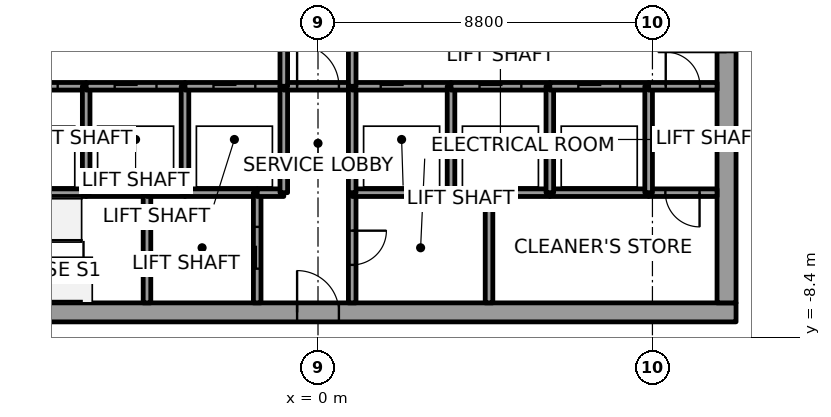
"""IFC4 building model, lengths in metres.
Left out: names, types, materials, properties, quantities, classifications, styles, units other than length and angle.
Written with IfcOpenShell. Run it as: python <this file> out.ifc"""

import sys

from ifc_helpers import new_model, si_unit, direction, frame, frame_2d, origin, place, context, subcontext, project, spatial, rectangle, extrude, element, fill, save


model = new_model("IFC4")
c1 = context("Model", 3, precision=1e-05, world=origin(), true_north=direction((0.0, 1.0)))
c2 = subcontext(c1, "Body", "Model", "MODEL_VIEW")
j1 = project(units=[si_unit("LENGTHUNIT", "METRE"), si_unit("PLANEANGLEUNIT", "RADIAN")], contexts=[c1])
p1 = place(None, origin())
s1 = spatial("IfcSite", under=j1, at=p1, CompositionType="ELEMENT")
p2 = place(p1, origin())
s2 = spatial("IfcBuilding", under=s1, at=p2, CompositionType="ELEMENT")
p3 = place(p2, frame((0.0, 0.0, 165.8)))
s3 = spatial("IfcBuildingStorey", under=s2, at=p3, CompositionType="ELEMENT", Elevation=165.8)
p4 = place(p3, frame((-11.0, -7.75, 0.0), z_axis=(0.0, 0.0, 1.0), x_axis=(1.0, 0.0, 0.0)))
e1 = element("IfcWall", 1, at=p4, inside=s3, PredefinedType="SHEAR", context=c2, shape_type="SweptSolid", body=[
    extrude(rectangle(XDim=22.0, YDim=0.5, at=frame_2d((11.0, 0.0))), origin(), (0.0, 0.0, 1.0), 4.0),
])
p5 = place(p4, frame((10.45, 0.0, 0.0)))
e2 = element("IfcOpeningElement", 2, at=p5, cuts=e1, PredefinedType="OPENING", context=c2, shape_type="SweptSolid", body=[
    extrude(rectangle(XDim=1.1, YDim=2.1, at=frame_2d((0.55, 1.05))), frame((0.0, 0.25, 0.0), z_axis=(0.0, -1.0, 0.0), x_axis=(1.0, 0.0, 0.0)), (0.0, 0.0, 1.0), 0.5),
])
p6 = place(p3, frame((10.75, -7.5, 0.0), z_axis=(0.0, 0.0, 1.0), x_axis=(0.0, 1.0, 0.0)))
e3 = element("IfcWall", 3, at=p6, inside=s3, PredefinedType="SHEAR", context=c2, shape_type="SweptSolid", body=[
    extrude(rectangle(XDim=15.0, YDim=0.5, at=frame_2d((7.5, 0.0))), origin(), (0.0, 0.0, 1.0), 4.0),
])
p7 = place(p6, frame((6.6, 0.0, 0.0)))
e4 = element("IfcOpeningElement", 4, at=p7, cuts=e3, PredefinedType="OPENING", context=c2, shape_type="SweptSolid", body=[
    extrude(rectangle(XDim=1.8, YDim=2.1, at=frame_2d((0.9, 1.05))), frame((0.0, 0.25, 0.0), z_axis=(0.0, -1.0, 0.0), x_axis=(1.0, 0.0, 0.0)), (0.0, 0.0, 1.0), 0.5),
])
p8 = place(p3, frame((-8.7, -4.6, 0.0), z_axis=(0.0, 0.0, 1.0), x_axis=(1.0, 0.0, 0.0)))
e5 = element("IfcWall", 5, at=p8, inside=s3, PredefinedType="SOLIDWALL", context=c2, shape_type="SweptSolid", body=[
    extrude(rectangle(XDim=2.6, YDim=0.2, at=frame_2d((1.3, 0.0))), origin(), (0.0, 0.0, 1.0), 3.85),
])
p9 = place(p3, frame((-8.7, -1.8, 0.0), z_axis=(0.0, 0.0, 1.0), x_axis=(1.0, 0.0, 0.0)))
e6 = element("IfcWall", 6, at=p9, inside=s3, PredefinedType="SOLIDWALL", context=c2, shape_type="SweptSolid", body=[
    extrude(rectangle(XDim=2.6, YDim=0.2, at=frame_2d((1.3, 0.0))), origin(), (0.0, 0.0, 1.0), 3.85),
])
p10 = place(p9, frame((0.75, 0.0, 0.0)))
e7 = element("IfcOpeningElement", 7, at=p10, cuts=e6, PredefinedType="OPENING", context=c2, shape_type="SweptSolid", body=[
    extrude(rectangle(XDim=1.1, YDim=2.1, at=frame_2d((0.55, 1.05))), frame((0.0, 0.1, 0.0), z_axis=(0.0, -1.0, 0.0), x_axis=(1.0, 0.0, 0.0)), (0.0, 0.0, 1.0), 0.2),
])
p11 = place(p3, frame((-6.1, -4.6, 0.0), z_axis=(0.0, 0.0, 1.0), x_axis=(1.0, 0.0, 0.0)))
e8 = element("IfcWall", 8, at=p11, inside=s3, PredefinedType="SOLIDWALL", context=c2, shape_type="SweptSolid", body=[
    extrude(rectangle(XDim=1.6, YDim=0.2, at=frame_2d((0.8, 0.0))), origin(), (0.0, 0.0, 1.0), 3.85),
])
p12 = place(p3, frame((-6.1, -4.6, 0.0), z_axis=(0.0, 0.0, 1.0), x_axis=(0.0, 1.0, 0.0)))
e9 = element("IfcWall", 9, at=p12, inside=s3, PredefinedType="SOLIDWALL", context=c2, shape_type="SweptSolid", body=[
    extrude(rectangle(XDim=2.8, YDim=0.2, at=frame_2d((1.4, 0.0))), origin(), (0.0, 0.0, 1.0), 3.85),
])
p13 = place(p3, frame((-6.1, -1.8, 0.0), z_axis=(0.0, 0.0, 1.0), x_axis=(1.0, 0.0, 0.0)))
e10 = element("IfcWall", 10, at=p13, inside=s3, PredefinedType="SOLIDWALL", context=c2, shape_type="SweptSolid", body=[
    extrude(rectangle(XDim=2.6, YDim=0.2, at=frame_2d((1.3, 0.0))), origin(), (0.0, 0.0, 1.0), 3.85),
])
p14 = place(p13, frame((0.75, 0.0, 0.0)))
e11 = element("IfcOpeningElement", 11, at=p14, cuts=e10, PredefinedType="OPENING", context=c2, shape_type="SweptSolid", body=[
    extrude(rectangle(XDim=1.1, YDim=2.1, at=frame_2d((0.55, 1.05))), frame((0.0, 0.1, 0.0), z_axis=(0.0, -1.0, 0.0), x_axis=(1.0, 0.0, 0.0)), (0.0, 0.0, 1.0), 0.2),
])
p15 = place(p3, frame((-4.5, -4.6, 0.0), z_axis=(0.0, 0.0, 1.0), x_axis=(0.0, -1.0, 0.0)))
e12 = element("IfcWall", 12, at=p15, inside=s3, PredefinedType="SOLIDWALL", context=c2, shape_type="SweptSolid", body=[
    extrude(rectangle(XDim=2.9, YDim=0.2, at=frame_2d((1.45, 0.0))), origin(), (0.0, 0.0, 1.0), 3.85),
])
p16 = place(p3, frame((-4.5, -4.6, 0.0), z_axis=(0.0, 0.0, 1.0), x_axis=(1.0, 0.0, 0.0)))
e13 = element("IfcWall", 13, at=p16, inside=s3, PredefinedType="SOLIDWALL", context=c2, shape_type="SweptSolid", body=[
    extrude(rectangle(XDim=1.0, YDim=0.2, at=frame_2d((0.5, 0.0))), origin(), (0.0, 0.0, 1.0), 3.85),
])
p17 = place(p3, frame((-3.5, -4.6, 0.0), z_axis=(0.0, 0.0, 1.0), x_axis=(1.0, 0.0, 0.0)))
e14 = element("IfcWall", 14, at=p17, inside=s3, PredefinedType="SOLIDWALL", context=c2, shape_type="SweptSolid", body=[
    extrude(rectangle(XDim=1.9, YDim=0.2, at=frame_2d((0.95, 0.0))), origin(), (0.0, 0.0, 1.0), 3.85),
])
p18 = place(p3, frame((-3.5, -4.6, 0.0), z_axis=(0.0, 0.0, 1.0), x_axis=(0.0, 1.0, 0.0)))
e15 = element("IfcWall", 15, at=p18, inside=s3, PredefinedType="SOLIDWALL", context=c2, shape_type="SweptSolid", body=[
    extrude(rectangle(XDim=2.8, YDim=0.2, at=frame_2d((1.4, 0.0))), origin(), (0.0, 0.0, 1.0), 3.85),
])
p19 = place(p3, frame((-3.5, -1.8, 0.0), z_axis=(0.0, 0.0, 1.0), x_axis=(1.0, 0.0, 0.0)))
e16 = element("IfcWall", 16, at=p19, inside=s3, PredefinedType="SOLIDWALL", context=c2, shape_type="SweptSolid", body=[
    extrude(rectangle(XDim=2.6, YDim=0.2, at=frame_2d((1.3, 0.0))), origin(), (0.0, 0.0, 1.0), 3.85),
])
p20 = place(p19, frame((0.75, 0.0, 0.0)))
e17 = element("IfcOpeningElement", 17, at=p20, cuts=e16, PredefinedType="OPENING", context=c2, shape_type="SweptSolid", body=[
    extrude(rectangle(XDim=1.1, YDim=2.1, at=frame_2d((0.55, 1.05))), frame((0.0, 0.1, 0.0), z_axis=(0.0, -1.0, 0.0), x_axis=(1.0, 0.0, 0.0)), (0.0, 0.0, 1.0), 0.2),
])
p21 = place(p3, frame((-1.6, -7.5, 0.0), z_axis=(0.0, 0.0, 1.0), x_axis=(0.0, 1.0, 0.0)))
e18 = element("IfcWall", 18, at=p21, inside=s3, PredefinedType="SOLIDWALL", context=c2, shape_type="SweptSolid", body=[
    extrude(rectangle(XDim=2.9, YDim=0.2, at=frame_2d((1.45, 0.0))), origin(), (0.0, 0.0, 1.0), 3.85),
])
p22 = place(p21, frame((0.9, 0.0, 0.0)))
e19 = element("IfcOpeningElement", 19, at=p22, cuts=e18, PredefinedType="OPENING", context=c2, shape_type="SweptSolid", body=[
    extrude(rectangle(XDim=1.1, YDim=2.1, at=frame_2d((0.55, 1.05))), frame((0.0, 0.1, 0.0), z_axis=(0.0, -1.0, 0.0), x_axis=(1.0, 0.0, 0.0)), (0.0, 0.0, 1.0), 0.2),
])
p23 = place(p3, frame((-1.6, -4.6, 0.0), z_axis=(0.0, 0.0, 1.0), x_axis=(1.0, 0.0, 0.0)))
e20 = element("IfcWall", 20, at=p23, inside=s3, PredefinedType="SOLIDWALL", context=c2, shape_type="SweptSolid", body=[
    extrude(rectangle(XDim=0.7, YDim=0.2, at=frame_2d((0.35, 0.0))), origin(), (0.0, 0.0, 1.0), 3.85),
])
p24 = place(p3, frame((-0.9, -4.6, 0.0), z_axis=(0.0, 0.0, 1.0), x_axis=(0.0, 1.0, 0.0)))
e21 = element("IfcWall", 21, at=p24, inside=s3, PredefinedType="SOLIDWALL", context=c2, shape_type="SweptSolid", body=[
    extrude(rectangle(XDim=2.8, YDim=0.2, at=frame_2d((1.4, 0.0))), origin(), (0.0, 0.0, 1.0), 3.85),
])
p25 = place(p3, frame((-0.9, -1.8, 0.0), z_axis=(0.0, 0.0, 1.0), x_axis=(1.0, 0.0, 0.0)))
e22 = element("IfcWall", 22, at=p25, inside=s3, PredefinedType="SOLIDWALL", context=c2, shape_type="SweptSolid", body=[
    extrude(rectangle(XDim=1.8, YDim=0.2, at=frame_2d((0.9, 0.0))), origin(), (0.0, 0.0, 1.0), 3.85),
])
p26 = place(p25, frame((0.35, 0.0, 0.0)))
e23 = element("IfcOpeningElement", 23, at=p26, cuts=e22, PredefinedType="OPENING", context=c2, shape_type="SweptSolid", body=[
    extrude(rectangle(XDim=1.1, YDim=2.1, at=frame_2d((0.55, 1.05))), frame((0.0, 0.1, 0.0), z_axis=(0.0, -1.0, 0.0), x_axis=(1.0, 0.0, 0.0)), (0.0, 0.0, 1.0), 0.2),
])
p27 = place(p3, frame((-0.9, 1.8, 0.0), z_axis=(0.0, 0.0, 1.0), x_axis=(0.0, -1.0, 0.0)))
e24 = element("IfcWall", 24, at=p27, inside=s3, PredefinedType="SOLIDWALL", context=c2, shape_type="SweptSolid", body=[
    extrude(rectangle(XDim=3.6, YDim=0.2, at=frame_2d((1.8, 0.0))), origin(), (0.0, 0.0, 1.0), 3.85),
])
p28 = place(p27, frame((1.05, 0.0, 0.0)))
e25 = element("IfcOpeningElement", 25, at=p28, cuts=e24, PredefinedType="OPENING", context=c2, shape_type="SweptSolid", body=[
    extrude(rectangle(XDim=1.5, YDim=2.1, at=frame_2d((0.75, 1.05))), frame((0.0, 0.1, 0.0), z_axis=(0.0, -1.0, 0.0), x_axis=(1.0, 0.0, 0.0)), (0.0, 0.0, 1.0), 0.2),
])
p29 = place(p3, frame((0.9, -4.6, 0.0), z_axis=(0.0, 0.0, 1.0), x_axis=(0.0, -1.0, 0.0)))
e26 = element("IfcWall", 26, at=p29, inside=s3, PredefinedType="SOLIDWALL", context=c2, shape_type="SweptSolid", body=[
    extrude(rectangle(XDim=2.9, YDim=0.2, at=frame_2d((1.45, 0.0))), origin(), (0.0, 0.0, 1.0), 3.85),
])
p30 = place(p29, frame((1.0, 0.0, 0.0)))
e27 = element("IfcOpeningElement", 27, at=p30, cuts=e26, PredefinedType="OPENING", context=c2, shape_type="SweptSolid", body=[
    extrude(rectangle(XDim=0.9, YDim=2.1, at=frame_2d((0.45, 1.05))), frame((0.0, 0.1, 0.0), z_axis=(0.0, -1.0, 0.0), x_axis=(1.0, 0.0, 0.0)), (0.0, 0.0, 1.0), 0.2),
])
p31 = place(p3, frame((3.5, -4.6, 0.0), z_axis=(0.0, 0.0, 1.0), x_axis=(-1.0, 0.0, 0.0)))
e28 = element("IfcWall", 28, at=p31, inside=s3, PredefinedType="SOLIDWALL", context=c2, shape_type="SweptSolid", body=[
    extrude(rectangle(XDim=2.6, YDim=0.2, at=frame_2d((1.3, 0.0))), origin(), (0.0, 0.0, 1.0), 3.85),
])
p32 = place(p3, frame((0.9, -1.8, 0.0), z_axis=(0.0, 0.0, 1.0), x_axis=(0.0, -1.0, 0.0)))
e29 = element("IfcWall", 29, at=p32, inside=s3, PredefinedType="SOLIDWALL", context=c2, shape_type="SweptSolid", body=[
    extrude(rectangle(XDim=2.8, YDim=0.2, at=frame_2d((1.4, 0.0))), origin(), (0.0, 0.0, 1.0), 3.85),
])
p33 = place(p3, frame((0.9, -1.8, 0.0), z_axis=(0.0, 0.0, 1.0), x_axis=(1.0, 0.0, 0.0)))
e30 = element("IfcWall", 30, at=p33, inside=s3, PredefinedType="SOLIDWALL", context=c2, shape_type="SweptSolid", body=[
    extrude(rectangle(XDim=2.6, YDim=0.2, at=frame_2d((1.3, 0.0))), origin(), (0.0, 0.0, 1.0), 3.85),
])
p34 = place(p33, frame((0.75, 0.0, 0.0)))
e31 = element("IfcOpeningElement", 31, at=p34, cuts=e30, PredefinedType="OPENING", context=c2, shape_type="SweptSolid", body=[
    extrude(rectangle(XDim=1.1, YDim=2.1, at=frame_2d((0.55, 1.05))), frame((0.0, 0.1, 0.0), z_axis=(0.0, -1.0, 0.0), x_axis=(1.0, 0.0, 0.0)), (0.0, 0.0, 1.0), 0.2),
])
p35 = place(p3, frame((0.9, -1.8, 0.0), z_axis=(0.0, 0.0, 1.0), x_axis=(0.0, 1.0, 0.0)))
e32 = element("IfcWall", 32, at=p35, inside=s3, PredefinedType="SOLIDWALL", context=c2, shape_type="SweptSolid", body=[
    extrude(rectangle(XDim=3.6, YDim=0.2, at=frame_2d((1.8, 0.0))), origin(), (0.0, 0.0, 1.0), 3.85),
])
p36 = place(p35, frame((1.05, 0.0, 0.0)))
e33 = element("IfcOpeningElement", 33, at=p36, cuts=e32, PredefinedType="OPENING", context=c2, shape_type="SweptSolid", body=[
    extrude(rectangle(XDim=1.5, YDim=2.1, at=frame_2d((0.75, 1.05))), frame((0.0, 0.1, 0.0), z_axis=(0.0, -1.0, 0.0), x_axis=(1.0, 0.0, 0.0)), (0.0, 0.0, 1.0), 0.2),
])
p37 = place(p3, frame((4.5, -4.6, 0.0), z_axis=(0.0, 0.0, 1.0), x_axis=(-1.0, 0.0, 0.0)))
e34 = element("IfcWall", 34, at=p37, inside=s3, PredefinedType="SOLIDWALL", context=c2, shape_type="SweptSolid", body=[
    extrude(rectangle(XDim=1.0, YDim=0.2, at=frame_2d((0.5, 0.0))), origin(), (0.0, 0.0, 1.0), 3.85),
])
p38 = place(p3, frame((3.5, -4.6, 0.0), z_axis=(0.0, 0.0, 1.0), x_axis=(0.0, 1.0, 0.0)))
e35 = element("IfcWall", 35, at=p38, inside=s3, PredefinedType="SOLIDWALL", context=c2, shape_type="SweptSolid", body=[
    extrude(rectangle(XDim=2.8, YDim=0.2, at=frame_2d((1.4, 0.0))), origin(), (0.0, 0.0, 1.0), 3.85),
])
p39 = place(p3, frame((3.5, -1.8, 0.0), z_axis=(0.0, 0.0, 1.0), x_axis=(1.0, 0.0, 0.0)))
e36 = element("IfcWall", 36, at=p39, inside=s3, PredefinedType="SOLIDWALL", context=c2, shape_type="SweptSolid", body=[
    extrude(rectangle(XDim=2.6, YDim=0.2, at=frame_2d((1.3, 0.0))), origin(), (0.0, 0.0, 1.0), 3.85),
])
p40 = place(p39, frame((0.75, 0.0, 0.0)))
e37 = element("IfcOpeningElement", 37, at=p40, cuts=e36, PredefinedType="OPENING", context=c2, shape_type="SweptSolid", body=[
    extrude(rectangle(XDim=1.1, YDim=2.1, at=frame_2d((0.55, 1.05))), frame((0.0, 0.1, 0.0), z_axis=(0.0, -1.0, 0.0), x_axis=(1.0, 0.0, 0.0)), (0.0, 0.0, 1.0), 0.2),
])
p41 = place(p3, frame((4.5, -4.6, 0.0), z_axis=(0.0, 0.0, 1.0), x_axis=(0.0, -1.0, 0.0)))
e38 = element("IfcWall", 38, at=p41, inside=s3, PredefinedType="SOLIDWALL", context=c2, shape_type="SweptSolid", body=[
    extrude(rectangle(XDim=2.9, YDim=0.2, at=frame_2d((1.45, 0.0))), origin(), (0.0, 0.0, 1.0), 3.85),
])
p42 = place(p3, frame((6.1, -4.6, 0.0), z_axis=(0.0, 0.0, 1.0), x_axis=(-1.0, 0.0, 0.0)))
e39 = element("IfcWall", 39, at=p42, inside=s3, PredefinedType="SOLIDWALL", context=c2, shape_type="SweptSolid", body=[
    extrude(rectangle(XDim=1.6, YDim=0.2, at=frame_2d((0.8, 0.0))), origin(), (0.0, 0.0, 1.0), 3.85),
])
p43 = place(p3, frame((8.7, -4.6, 0.0), z_axis=(0.0, 0.0, 1.0), x_axis=(-1.0, 0.0, 0.0)))
e40 = element("IfcWall", 40, at=p43, inside=s3, PredefinedType="SOLIDWALL", context=c2, shape_type="SweptSolid", body=[
    extrude(rectangle(XDim=2.6, YDim=0.2, at=frame_2d((1.3, 0.0))), origin(), (0.0, 0.0, 1.0), 3.85),
])
p44 = place(p3, frame((6.1, -4.6, 0.0), z_axis=(0.0, 0.0, 1.0), x_axis=(0.0, 1.0, 0.0)))
e41 = element("IfcWall", 41, at=p44, inside=s3, PredefinedType="SOLIDWALL", context=c2, shape_type="SweptSolid", body=[
    extrude(rectangle(XDim=2.8, YDim=0.2, at=frame_2d((1.4, 0.0))), origin(), (0.0, 0.0, 1.0), 3.85),
])
p45 = place(p3, frame((6.1, -1.8, 0.0), z_axis=(0.0, 0.0, 1.0), x_axis=(1.0, 0.0, 0.0)))
e42 = element("IfcWall", 42, at=p45, inside=s3, PredefinedType="SOLIDWALL", context=c2, shape_type="SweptSolid", body=[
    extrude(rectangle(XDim=2.6, YDim=0.2, at=frame_2d((1.3, 0.0))), origin(), (0.0, 0.0, 1.0), 3.85),
])
p46 = place(p45, frame((0.75, 0.0, 0.0)))
e43 = element("IfcOpeningElement", 43, at=p46, cuts=e42, PredefinedType="OPENING", context=c2, shape_type="SweptSolid", body=[
    extrude(rectangle(XDim=1.1, YDim=2.1, at=frame_2d((0.55, 1.05))), frame((0.0, 0.1, 0.0), z_axis=(0.0, -1.0, 0.0), x_axis=(1.0, 0.0, 0.0)), (0.0, 0.0, 1.0), 0.2),
])
p47 = place(p3, frame((10.5, -4.6, 0.0), z_axis=(0.0, 0.0, 1.0), x_axis=(-1.0, 0.0, 0.0)))
e44 = element("IfcWall", 44, at=p47, inside=s3, PredefinedType="SOLIDWALL", context=c2, shape_type="SweptSolid", body=[
    extrude(rectangle(XDim=1.8, YDim=0.2, at=frame_2d((0.9, 0.0))), origin(), (0.0, 0.0, 1.0), 3.85),
])
p48 = place(p47, frame((0.46, 0.0, 0.0)))
e45 = element("IfcOpeningElement", 45, at=p48, cuts=e44, PredefinedType="OPENING", context=c2, shape_type="SweptSolid", body=[
    extrude(rectangle(XDim=0.9, YDim=2.1, at=frame_2d((0.45, 1.05))), frame((0.0, 0.1, 0.0), z_axis=(0.0, -1.0, 0.0), x_axis=(1.0, 0.0, 0.0)), (0.0, 0.0, 1.0), 0.2),
])
p49 = place(p3, frame((8.7, -1.8, 0.0), z_axis=(0.0, 0.0, 1.0), x_axis=(0.0, -1.0, 0.0)))
e46 = element("IfcWall", 46, at=p49, inside=s3, PredefinedType="SOLIDWALL", context=c2, shape_type="SweptSolid", body=[
    extrude(rectangle(XDim=2.8, YDim=0.2, at=frame_2d((1.4, 0.0))), origin(), (0.0, 0.0, 1.0), 3.85),
])
p50 = place(p3, frame((8.7, -1.8, 0.0), z_axis=(0.0, 0.0, 1.0), x_axis=(1.0, 0.0, 0.0)))
e47 = element("IfcWall", 47, at=p50, inside=s3, PredefinedType="SOLIDWALL", context=c2, shape_type="SweptSolid", body=[
    extrude(rectangle(XDim=1.8, YDim=0.2, at=frame_2d((0.9, 0.0))), origin(), (0.0, 0.0, 1.0), 3.85),
])
p51 = place(p50, frame((0.45, 0.0, 0.0)))
e48 = element("IfcOpeningElement", 48, at=p51, cuts=e47, PredefinedType="OPENING", context=c2, shape_type="SweptSolid", body=[
    extrude(rectangle(XDim=0.9, YDim=2.1, at=frame_2d((0.45, 1.05))), frame((0.0, 0.1, 0.0), z_axis=(0.0, -1.0, 0.0), x_axis=(1.0, 0.0, 0.0)), (0.0, 0.0, 1.0), 0.2),
])
p52 = place(p10, origin())
e49 = element("IfcDoor", 49, at=p52, inside=s3, OperationType="SLIDING_TO_LEFT", PredefinedType="DOOR", context=c2, shape_type="SweptSolid", body=[
    extrude(rectangle(XDim=1.1, YDim=2.1, at=frame_2d((0.55, 1.05))), frame((0.0, 0.025, 0.0), z_axis=(0.0, -1.0, 0.0), x_axis=(1.0, 0.0, 0.0)), (0.0, 0.0, 1.0), 0.05),
])
fill(e7, e49)
p53 = place(p14, origin())
e50 = element("IfcDoor", 50, at=p53, inside=s3, OperationType="SLIDING_TO_RIGHT", PredefinedType="DOOR", context=c2, shape_type="SweptSolid", body=[
    extrude(rectangle(XDim=1.1, YDim=2.1, at=frame_2d((0.55, 1.05))), frame((0.0, 0.025, 0.0), z_axis=(0.0, -1.0, 0.0), x_axis=(1.0, 0.0, 0.0)), (0.0, 0.0, 1.0), 0.05),
])
fill(e11, e50)
p54 = place(p20, origin())
e51 = element("IfcDoor", 51, at=p54, inside=s3, OperationType="SLIDING_TO_RIGHT", PredefinedType="DOOR", context=c2, shape_type="SweptSolid", body=[
    extrude(rectangle(XDim=1.1, YDim=2.1, at=frame_2d((0.55, 1.05))), frame((0.0, 0.025, 0.0), z_axis=(0.0, -1.0, 0.0), x_axis=(1.0, 0.0, 0.0)), (0.0, 0.0, 1.0), 0.05),
])
fill(e17, e51)
p55 = place(p34, origin())
e52 = element("IfcDoor", 52, at=p55, inside=s3, OperationType="SLIDING_TO_LEFT", PredefinedType="DOOR", context=c2, shape_type="SweptSolid", body=[
    extrude(rectangle(XDim=1.1, YDim=2.1, at=frame_2d((0.55, 1.05))), frame((0.0, 0.025, 0.0), z_axis=(0.0, -1.0, 0.0), x_axis=(1.0, 0.0, 0.0)), (0.0, 0.0, 1.0), 0.05),
])
fill(e31, e52)
p56 = place(p40, origin())
e53 = element("IfcDoor", 53, at=p56, inside=s3, OperationType="SLIDING_TO_RIGHT", PredefinedType="DOOR", context=c2, shape_type="SweptSolid", body=[
    extrude(rectangle(XDim=1.1, YDim=2.1, at=frame_2d((0.55, 1.05))), frame((0.0, 0.025, 0.0), z_axis=(0.0, -1.0, 0.0), x_axis=(1.0, 0.0, 0.0)), (0.0, 0.0, 1.0), 0.05),
])
fill(e37, e53)
p57 = place(p46, origin())
e54 = element("IfcDoor", 54, at=p57, inside=s3, OperationType="SLIDING_TO_LEFT", PredefinedType="DOOR", context=c2, shape_type="SweptSolid", body=[
    extrude(rectangle(XDim=1.1, YDim=2.1, at=frame_2d((0.55, 1.05))), frame((0.0, 0.025, 0.0), z_axis=(0.0, -1.0, 0.0), x_axis=(1.0, 0.0, 0.0)), (0.0, 0.0, 1.0), 0.05),
])
fill(e43, e54)
p58 = place(p22, origin())
e55 = element("IfcDoor", 55, at=p58, inside=s3, OperationType="SLIDING_TO_LEFT", PredefinedType="DOOR", context=c2, shape_type="SweptSolid", body=[
    extrude(rectangle(XDim=1.1, YDim=2.1, at=frame_2d((0.55, 1.05))), frame((0.0, 0.025, 0.0), z_axis=(0.0, -1.0, 0.0), x_axis=(1.0, 0.0, 0.0)), (0.0, 0.0, 1.0), 0.05),
])
fill(e19, e55)
p59 = place(p26, origin())
e56 = element("IfcDoor", 56, at=p59, inside=s3, OperationType="SINGLE_SWING_RIGHT", PredefinedType="DOOR", context=c2, shape_type="SweptSolid", body=[
    extrude(rectangle(XDim=1.1, YDim=2.1, at=frame_2d((0.55, 1.05))), frame((0.0, 0.025, 0.0), z_axis=(0.0, -1.0, 0.0), x_axis=(1.0, 0.0, 0.0)), (0.0, 0.0, 1.0), 0.05),
])
fill(e23, e56)
p60 = place(p48, origin())
e57 = element("IfcDoor", 57, at=p60, inside=s3, OperationType="SINGLE_SWING_RIGHT", PredefinedType="DOOR", context=c2, shape_type="SweptSolid", body=[
    extrude(rectangle(XDim=0.9, YDim=2.1, at=frame_2d((0.45, 1.05))), frame((0.0, 0.025, 0.0), z_axis=(0.0, -1.0, 0.0), x_axis=(1.0, 0.0, 0.0)), (0.0, 0.0, 1.0), 0.05),
])
fill(e45, e57)
p61 = place(p51, origin())
e58 = element("IfcDoor", 58, at=p61, inside=s3, OperationType="SINGLE_SWING_LEFT", PredefinedType="DOOR", context=c2, shape_type="SweptSolid", body=[
    extrude(rectangle(XDim=0.9, YDim=2.1, at=frame_2d((0.45, 1.05))), frame((0.0, 0.025, 0.0), z_axis=(0.0, -1.0, 0.0), x_axis=(1.0, 0.0, 0.0)), (0.0, 0.0, 1.0), 0.05),
])
fill(e48, e58)
p62 = place(p30, origin())
e59 = element("IfcDoor", 59, at=p62, inside=s3, OperationType="SINGLE_SWING_RIGHT", PredefinedType="DOOR", context=c2, shape_type="SweptSolid", body=[
    extrude(rectangle(XDim=0.9, YDim=2.1, at=frame_2d((0.45, 1.05))), frame((0.0, 0.025, 0.0), z_axis=(0.0, -1.0, 0.0), x_axis=(1.0, 0.0, 0.0)), (0.0, 0.0, 1.0), 0.05),
])
fill(e27, e59)
p63 = place(p7, origin())
e60 = element("IfcDoor", 60, at=p63, inside=s3, OperationType="DOUBLE_DOOR_SINGLE_SWING", PredefinedType="DOOR", context=c2, shape_type="SweptSolid", body=[
    extrude(rectangle(XDim=1.8, YDim=2.1, at=frame_2d((0.9, 1.05))), frame((0.0, 0.025, 0.0), z_axis=(0.0, -1.0, 0.0), x_axis=(1.0, 0.0, 0.0)), (0.0, 0.0, 1.0), 0.05),
])
fill(e4, e60)
p64 = place(p5, origin())
e61 = element("IfcDoor", 61, at=p64, inside=s3, OperationType="SINGLE_SWING_RIGHT", PredefinedType="DOOR", context=c2, shape_type="SweptSolid", body=[
    extrude(rectangle(XDim=1.1, YDim=2.1, at=frame_2d((0.55, 1.05))), frame((0.0, 0.025, 0.0), z_axis=(0.0, -1.0, 0.0), x_axis=(1.0, 0.0, 0.0)), (0.0, 0.0, 1.0), 0.05),
])
fill(e2, e61)
save(model, sys.argv[1])
